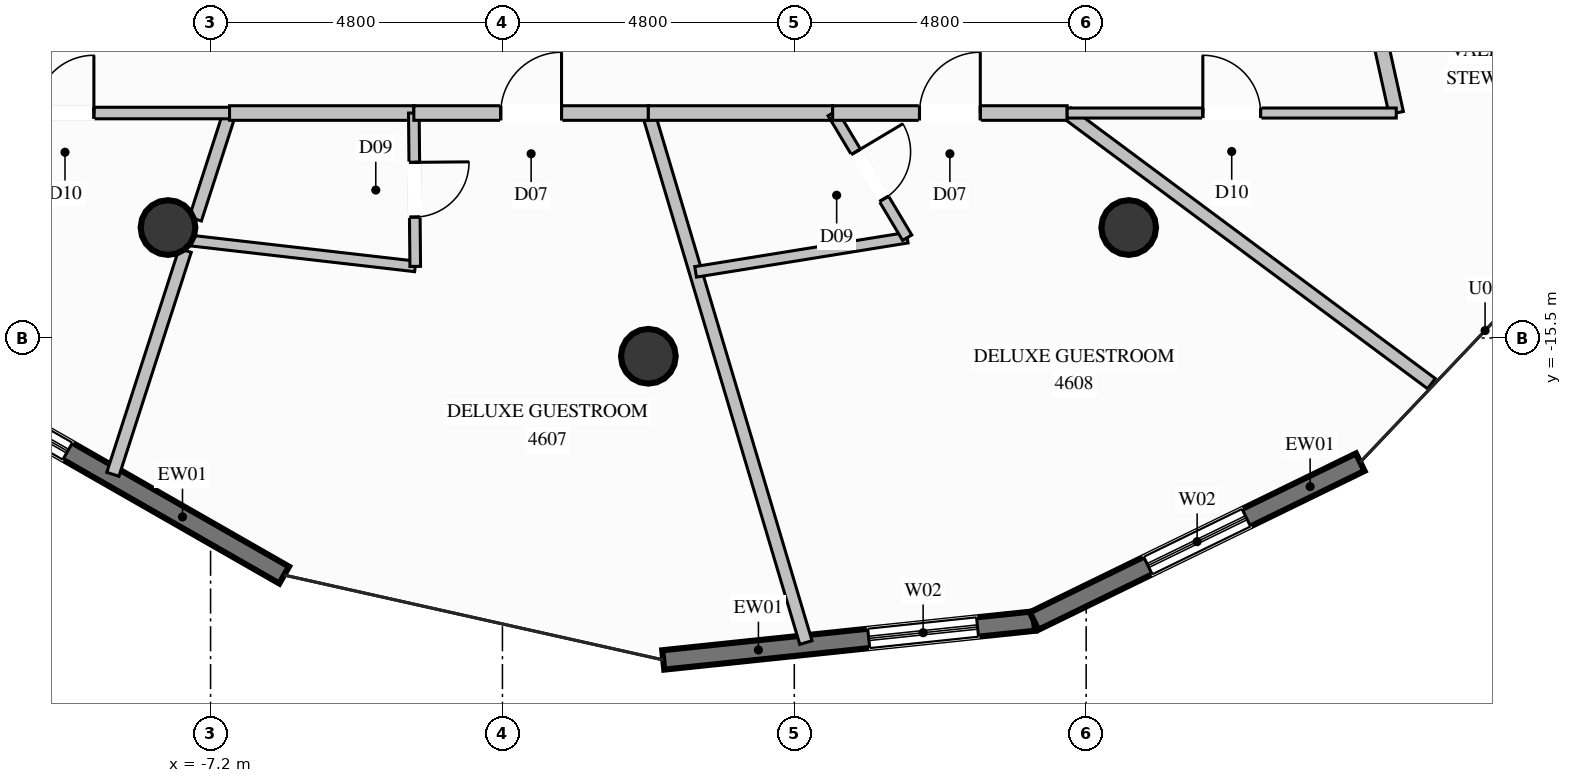
"""IFC4 building model, lengths in metres.
Left out: names, types, materials, properties, quantities, classifications, styles, units other than length and angle.
Written with IfcOpenShell. Run it as: python <this file> out.ifc"""

import sys

from ifc_helpers import new_model, si_unit, direction, frame, frame_2d, origin, origin_2d, place, context, subcontext, project, spatial, rectangle, circle, extrude, element, fill, save


model = new_model("IFC4")
c1 = context("Model", 3, precision=1e-05, world=origin(), true_north=direction((0.0, 1.0)))
c2 = subcontext(c1, "Body", "Model", "MODEL_VIEW")
j1 = project(units=[si_unit("LENGTHUNIT", "METRE"), si_unit("PLANEANGLEUNIT", "RADIAN")], contexts=[c1])
p1 = place(None, origin())
s1 = spatial("IfcSite", under=j1, at=p1, CompositionType="ELEMENT")
p2 = place(p1, origin())
s2 = spatial("IfcBuilding", under=s1, at=p2, CompositionType="ELEMENT")
p3 = place(p2, frame((0.0, 0.0, 173.2)))
s3 = spatial("IfcBuildingStorey", under=s2, at=p3, CompositionType="ELEMENT", Elevation=173.2)
for number, where, z_axis, x_axis in (
    (1, (-7.9, -13.683, 0.0), (0.0, 0.0, 1.0), (1.0, 0.0, 0.0)),
    (2, (0.0, -15.8, 0.0), (0.0, 0.0, 1.0), (1.0, 0.0, 0.0)),
    (3, (7.9, -13.683, 0.0), (0.0, 0.0, 1.0), (1.0, 0.0, 0.0)),
):
    element("IfcColumn", number, at=place(p3, frame(where, z_axis=z_axis, x_axis=x_axis)), inside=s3, PredefinedType="COLUMN", context=c2, shape_type="SweptSolid", body=[
        extrude(circle(Radius=0.45, at=origin_2d()), origin(), (0.0, 0.0, 1.0), 3.6),
    ])
p4 = place(p3, frame((-5.99, -19.398, 0.0), z_axis=(0.0, 0.0, 1.0), x_axis=(-0.868052920032, 0.496471678974, 0.0)))
e4 = element("IfcWall", 4, at=p4, inside=s3, PredefinedType="SOLIDWALL", context=c2, shape_type="SweptSolid", body=[
    extrude(rectangle(XDim=6.637, YDim=0.32, at=frame_2d((3.318, 0.0))), origin(), (0.0, 0.0, 1.0), 3.36),
])
p5 = place(p4, frame((4.102, 0.0, 0.35)))
e5 = element("IfcOpeningElement", 5, at=p5, cuts=e4, PredefinedType="OPENING", context=c2, shape_type="SweptSolid", body=[
    extrude(rectangle(XDim=1.8, YDim=2.6, at=frame_2d((0.9, 1.3))), frame((0.0, 0.17, 0.0), z_axis=(0.0, -1.0, 0.0), x_axis=(1.0, 0.0, 0.0)), (0.0, 0.0, 1.0), 0.34),
])
p6 = place(p3, frame((6.343, -20.155, 0.0), z_axis=(0.0, 0.0, 1.0), x_axis=(-0.994555738522, -0.104205964195, 0.0)))
e6 = element("IfcWall", 6, at=p6, inside=s3, PredefinedType="SOLIDWALL", context=c2, shape_type="SweptSolid", body=[
    extrude(rectangle(XDim=6.131, YDim=0.32, at=frame_2d((3.066, 0.0))), origin(), (0.0, 0.0, 1.0), 3.36),
])
p7 = place(p6, frame((0.934, 0.0, 0.35)))
e7 = element("IfcOpeningElement", 7, at=p7, cuts=e6, PredefinedType="OPENING", context=c2, shape_type="SweptSolid", body=[
    extrude(rectangle(XDim=1.8, YDim=2.6, at=frame_2d((0.9, 1.3))), frame((0.0, 0.17, 0.0), z_axis=(0.0, -1.0, 0.0), x_axis=(1.0, 0.0, 0.0)), (0.0, 0.0, 1.0), 0.34),
])
p8 = place(p3, frame((11.708, -17.542, 0.0), z_axis=(0.0, 0.0, 1.0), x_axis=(-0.899034471399, -0.437877858811, 0.0)))
e8 = element("IfcWall", 8, at=p8, inside=s3, PredefinedType="SOLIDWALL", context=c2, shape_type="SweptSolid", body=[
    extrude(rectangle(XDim=5.968, YDim=0.32, at=frame_2d((2.984, 0.0))), origin(), (0.0, 0.0, 1.0), 3.36),
])
p9 = place(p8, frame((2.084, 0.0, 0.35)))
e9 = element("IfcOpeningElement", 9, at=p9, cuts=e8, PredefinedType="OPENING", context=c2, shape_type="SweptSolid", body=[
    extrude(rectangle(XDim=1.8, YDim=2.6, at=frame_2d((0.9, 1.3))), frame((0.0, 0.17, 0.0), z_axis=(0.0, -1.0, 0.0), x_axis=(1.0, 0.0, 0.0)), (0.0, 0.0, 1.0), 0.34),
])
p10 = place(p3, frame((-6.888, -11.8, 0.0), z_axis=(0.0, 0.0, 1.0), x_axis=(-0.307220756357, -0.95163827522, 0.0)))
e10 = element("IfcWall", 10, at=p10, inside=s3, PredefinedType="PARTITIONING", context=c2, shape_type="SweptSolid", body=[
    extrude(rectangle(XDim=1.833, YDim=0.21, at=frame_2d((0.916, 0.0))), origin(), (0.0, 0.0, 1.0), 2.801),
])
p11 = place(p3, frame((-7.618, -14.059, 0.0), z_axis=(0.0, 0.0, 1.0), x_axis=(-0.307297747986, -0.9516134163, 0.0)))
e11 = element("IfcWall", 11, at=p11, inside=s3, PredefinedType="PARTITIONING", context=c2, shape_type="SweptSolid", body=[
    extrude(rectangle(XDim=3.869, YDim=0.21, at=frame_2d((1.935, 0.0))), origin(), (0.0, 0.0, 1.0), 3.36),
])
p12 = place(p3, frame((-12.3, -11.8, 0.0), z_axis=(0.0, 0.0, 1.0), x_axis=(1.0, 0.0, 0.0)))
e12 = element("IfcWall", 12, at=p12, inside=s3, PredefinedType="PARTITIONING", context=c2, shape_type="SweptSolid", body=[
    extrude(rectangle(XDim=5.412, YDim=0.19, at=frame_2d((2.706, 0.0))), origin(), (0.0, 0.0, 1.0), 3.36),
])
p13 = place(p12, frame((2.231, 0.0, 0.0)))
e13 = element("IfcOpeningElement", 13, at=p13, cuts=e12, PredefinedType="OPENING", context=c2, shape_type="SweptSolid", body=[
    extrude(rectangle(XDim=0.95, YDim=2.1, at=frame_2d((0.475, 1.05))), frame((0.0, 0.105, 0.0), z_axis=(0.0, -1.0, 0.0), x_axis=(1.0, 0.0, 0.0)), (0.0, 0.0, 1.0), 0.21),
])
p14 = place(p3, frame((-6.888, -11.8, 0.0), z_axis=(0.0, 0.0, 1.0), x_axis=(1.0, 0.0, 0.0)))
e14 = element("IfcWall", 14, at=p14, inside=s3, PredefinedType="PARTITIONING", context=c2, shape_type="SweptSolid", body=[
    extrude(rectangle(XDim=3.031, YDim=0.24, at=frame_2d((1.516, 0.0))), origin(), (0.0, 0.0, 1.0), 3.36),
])
p15 = place(p3, frame((-7.564, -13.893, 0.0), z_axis=(0.0, 0.0, 1.0), x_axis=(0.993452151759, -0.114248948203, 0.0)))
e15 = element("IfcWall", 15, at=p15, inside=s3, PredefinedType="PLUMBINGWALL", context=c2, shape_type="SweptSolid", body=[
    extrude(rectangle(XDim=3.755, YDim=0.175, at=frame_2d((1.877, 0.0))), origin(), (0.0, 0.0, 1.0), 2.929),
])
p16 = place(p3, frame((-3.857, -11.8, 0.0), z_axis=(0.0, 0.0, 1.0), x_axis=(0.009099332858, -0.999958600214, 0.0)))
e16 = element("IfcWall", 16, at=p16, inside=s3, PredefinedType="PLUMBINGWALL", context=c2, shape_type="SweptSolid", body=[
    extrude(rectangle(XDim=2.522, YDim=0.175, at=frame_2d((1.261, 0.0))), origin(), (0.0, 0.0, 1.0), 3.36),
])
p17 = place(p16, frame((0.811, 0.0, 0.0)))
e17 = element("IfcOpeningElement", 17, at=p17, cuts=e16, PredefinedType="OPENING", context=c2, shape_type="SweptSolid", body=[
    extrude(rectangle(XDim=0.9, YDim=2.1, at=frame_2d((0.45, 1.05))), frame((0.0, 0.098, 0.0), z_axis=(0.0, -1.0, 0.0), x_axis=(1.0, 0.0, 0.0)), (0.0, 0.0, 1.0), 0.195),
])
p18 = place(p3, frame((0.0, -11.8, 0.0), z_axis=(0.0, 0.0, 1.0), x_axis=(0.285192468368, -0.958470268702, 0.0)))
e18 = element("IfcWall", 18, at=p18, inside=s3, PredefinedType="PARTITIONING", context=c2, shape_type="SweptSolid", body=[
    extrude(rectangle(XDim=9.085, YDim=0.21, at=frame_2d((4.542, 0.0))), origin(), (0.0, 0.0, 1.0), 3.36),
])
p19 = place(p3, frame((-3.857, -11.8, 0.0), z_axis=(0.0, 0.0, 1.0), x_axis=(1.0, 0.0, 0.0)))
e19 = element("IfcWall", 19, at=p19, inside=s3, PredefinedType="PARTITIONING", context=c2, shape_type="SweptSolid", body=[
    extrude(rectangle(XDim=3.857, YDim=0.24, at=frame_2d((1.928, 0.0))), origin(), (0.0, 0.0, 1.0), 3.36),
])
p20 = place(p19, frame((1.429, 0.0, 0.0)))
e20 = element("IfcOpeningElement", 20, at=p20, cuts=e19, PredefinedType="OPENING", context=c2, shape_type="SweptSolid", body=[
    extrude(rectangle(XDim=1.0, YDim=2.2, at=frame_2d((0.5, 1.1))), frame((0.0, 0.13, 0.0), z_axis=(0.0, -1.0, 0.0), x_axis=(1.0, 0.0, 0.0)), (0.0, 0.0, 1.0), 0.26),
])
p21 = place(p3, frame((0.0, -11.8, 0.0), z_axis=(0.0, 0.0, 1.0), x_axis=(1.0, 0.0, 0.0)))
e21 = element("IfcWall", 21, at=p21, inside=s3, PredefinedType="PARTITIONING", context=c2, shape_type="SweptSolid", body=[
    extrude(rectangle(XDim=3.031, YDim=0.24, at=frame_2d((1.516, 0.0))), origin(), (0.0, 0.0, 1.0), 3.36),
])
p22 = place(p3, frame((0.777, -14.412, 0.0), z_axis=(0.0, 0.0, 1.0), x_axis=(0.987208789181, 0.159432765027, 0.0)))
e22 = element("IfcWall", 22, at=p22, inside=s3, PredefinedType="PLUMBINGWALL", context=c2, shape_type="SweptSolid", body=[
    extrude(rectangle(XDim=3.525, YDim=0.175, at=frame_2d((1.763, 0.0))), origin(), (0.0, 0.0, 1.0), 3.36),
])
p23 = place(p3, frame((3.031, -11.8, 0.0), z_axis=(0.0, 0.0, 1.0), x_axis=(0.513277784821, -0.858222532685, 0.0)))
e23 = element("IfcWall", 23, at=p23, inside=s3, PredefinedType="PLUMBINGWALL", context=c2, shape_type="SweptSolid", body=[
    extrude(rectangle(XDim=2.389, YDim=0.175, at=frame_2d((1.194, 0.0))), origin(), (0.0, 0.0, 1.0), 3.36),
])
p24 = place(p23, frame((0.744, 0.0, 0.0)))
e24 = element("IfcOpeningElement", 24, at=p24, cuts=e23, PredefinedType="OPENING", context=c2, shape_type="SweptSolid", body=[
    extrude(rectangle(XDim=0.9, YDim=2.1, at=frame_2d((0.45, 1.05))), frame((0.0, 0.098, 0.0), z_axis=(0.0, -1.0, 0.0), x_axis=(1.0, 0.0, 0.0)), (0.0, 0.0, 1.0), 0.195),
])
p25 = place(p3, frame((6.888, -11.8, 0.0), z_axis=(0.0, 0.0, 1.0), x_axis=(0.802774719759, -0.596282440892, 0.0)))
e25 = element("IfcWall", 25, at=p25, inside=s3, PredefinedType="PARTITIONING", context=c2, shape_type="SweptSolid", body=[
    extrude(rectangle(XDim=7.463, YDim=0.21, at=frame_2d((3.731, 0.0))), origin(), (0.0, 0.0, 1.0), 3.36),
])
p26 = place(p3, frame((3.031, -11.8, 0.0), z_axis=(0.0, 0.0, 1.0), x_axis=(1.0, 0.0, 0.0)))
e26 = element("IfcWall", 26, at=p26, inside=s3, PredefinedType="PARTITIONING", context=c2, shape_type="SweptSolid", body=[
    extrude(rectangle(XDim=3.857, YDim=0.24, at=frame_2d((1.928, 0.0))), origin(), (0.0, 0.0, 1.0), 3.36),
])
p27 = place(p26, frame((1.428, 0.0, 0.0)))
e27 = element("IfcOpeningElement", 27, at=p27, cuts=e26, PredefinedType="OPENING", context=c2, shape_type="SweptSolid", body=[
    extrude(rectangle(XDim=1.0, YDim=2.2, at=frame_2d((0.5, 1.1))), frame((0.0, 0.13, 0.0), z_axis=(0.0, -1.0, 0.0), x_axis=(1.0, 0.0, 0.0)), (0.0, 0.0, 1.0), 0.26),
])
p28 = place(p3, frame((12.3, -11.8, 0.0), z_axis=(0.0, 0.0, 1.0), x_axis=(-0.21572328796, 0.976454537104, 0.0)))
e28 = element("IfcWall", 28, at=p28, inside=s3, PredefinedType="PARTITIONING", context=c2, shape_type="SweptSolid", body=[
    extrude(rectangle(XDim=5.633, YDim=0.24, at=frame_2d((2.816, 0.0))), origin(), (0.0, 0.0, 1.0), 3.36),
])
p29 = place(p3, frame((6.888, -11.8, 0.0), z_axis=(0.0, 0.0, 1.0), x_axis=(1.0, 0.0, 0.0)))
e29 = element("IfcWall", 29, at=p29, inside=s3, PredefinedType="PARTITIONING", context=c2, shape_type="SweptSolid", body=[
    extrude(rectangle(XDim=5.412, YDim=0.165, at=frame_2d((2.706, 0.0))), origin(), (0.0, 0.0, 1.0), 3.36),
])
p30 = place(p29, frame((2.231, 0.0, 0.0)))
e30 = element("IfcOpeningElement", 30, at=p30, cuts=e29, PredefinedType="OPENING", context=c2, shape_type="SweptSolid", body=[
    extrude(rectangle(XDim=0.95, YDim=2.1, at=frame_2d((0.475, 1.05))), frame((0.0, 0.093, 0.0), z_axis=(0.0, -1.0, 0.0), x_axis=(1.0, 0.0, 0.0)), (0.0, 0.0, 1.0), 0.185),
])
p31 = place(p5, origin())
e31 = element("IfcWindow", 31, at=p31, inside=s3, PartitioningType="SINGLE_PANEL", PredefinedType="WINDOW", context=c2, shape_type="SweptSolid", body=[
    extrude(rectangle(XDim=1.8, YDim=2.6, at=frame_2d((0.9, 1.3))), frame((0.0, 0.03, 0.0), z_axis=(0.0, -1.0, 0.0), x_axis=(1.0, 0.0, 0.0)), (0.0, 0.0, 1.0), 0.06),
])
fill(e5, e31)
p32 = place(p7, origin())
e32 = element("IfcWindow", 32, at=p32, inside=s3, PartitioningType="SINGLE_PANEL", PredefinedType="WINDOW", context=c2, shape_type="SweptSolid", body=[
    extrude(rectangle(XDim=1.8, YDim=2.6, at=frame_2d((0.9, 1.3))), frame((0.0, 0.03, 0.0), z_axis=(0.0, -1.0, 0.0), x_axis=(1.0, 0.0, 0.0)), (0.0, 0.0, 1.0), 0.06),
])
fill(e7, e32)
p33 = place(p9, origin())
e33 = element("IfcWindow", 33, at=p33, inside=s3, PartitioningType="SINGLE_PANEL", PredefinedType="WINDOW", context=c2, shape_type="SweptSolid", body=[
    extrude(rectangle(XDim=1.8, YDim=2.6, at=frame_2d((0.9, 1.3))), frame((0.0, 0.03, 0.0), z_axis=(0.0, -1.0, 0.0), x_axis=(1.0, 0.0, 0.0)), (0.0, 0.0, 1.0), 0.06),
])
fill(e9, e33)
p34 = place(p13, origin())
e34 = element("IfcDoor", 34, at=p34, inside=s3, OperationType="SINGLE_SWING_RIGHT", PredefinedType="DOOR", context=c2, shape_type="SweptSolid", body=[
    extrude(rectangle(XDim=0.95, YDim=2.1, at=frame_2d((0.475, 1.05))), frame((0.0, 0.025, 0.0), z_axis=(0.0, -1.0, 0.0), x_axis=(1.0, 0.0, 0.0)), (0.0, 0.0, 1.0), 0.05),
])
fill(e13, e34)
p35 = place(p17, origin())
e35 = element("IfcDoor", 35, at=p35, inside=s3, OperationType="SINGLE_SWING_LEFT", PredefinedType="DOOR", context=c2, shape_type="SweptSolid", body=[
    extrude(rectangle(XDim=0.9, YDim=2.1, at=frame_2d((0.45, 1.05))), frame((0.0, 0.025, 0.0), z_axis=(0.0, -1.0, 0.0), x_axis=(1.0, 0.0, 0.0)), (0.0, 0.0, 1.0), 0.05),
])
fill(e17, e35)
p36 = place(p20, origin())
e36 = element("IfcDoor", 36, at=p36, inside=s3, OperationType="SINGLE_SWING_RIGHT", PredefinedType="DOOR", context=c2, shape_type="SweptSolid", body=[
    extrude(rectangle(XDim=1.0, YDim=2.2, at=frame_2d((0.5, 1.1))), frame((0.0, 0.025, 0.0), z_axis=(0.0, -1.0, 0.0), x_axis=(1.0, 0.0, 0.0)), (0.0, 0.0, 1.0), 0.05),
])
fill(e20, e36)
p37 = place(p24, origin())
e37 = element("IfcDoor", 37, at=p37, inside=s3, OperationType="SINGLE_SWING_LEFT", PredefinedType="DOOR", context=c2, shape_type="SweptSolid", body=[
    extrude(rectangle(XDim=0.9, YDim=2.1, at=frame_2d((0.45, 1.05))), frame((0.0, 0.025, 0.0), z_axis=(0.0, -1.0, 0.0), x_axis=(1.0, 0.0, 0.0)), (0.0, 0.0, 1.0), 0.05),
])
fill(e24, e37)
p38 = place(p27, origin())
e38 = element("IfcDoor", 38, at=p38, inside=s3, OperationType="SINGLE_SWING_RIGHT", PredefinedType="DOOR", context=c2, shape_type="SweptSolid", body=[
    extrude(rectangle(XDim=1.0, YDim=2.2, at=frame_2d((0.5, 1.1))), frame((0.0, 0.025, 0.0), z_axis=(0.0, -1.0, 0.0), x_axis=(1.0, 0.0, 0.0)), (0.0, 0.0, 1.0), 0.05),
])
fill(e27, e38)
p39 = place(p30, origin())
e39 = element("IfcDoor", 39, at=p39, inside=s3, OperationType="SINGLE_SWING_LEFT", PredefinedType="DOOR", context=c2, shape_type="SweptSolid", body=[
    extrude(rectangle(XDim=0.95, YDim=2.1, at=frame_2d((0.475, 1.05))), frame((0.0, 0.025, 0.0), z_axis=(0.0, -1.0, 0.0), x_axis=(1.0, 0.0, 0.0)), (0.0, 0.0, 1.0), 0.05),
])
fill(e30, e39)
save(model, sys.argv[1])
